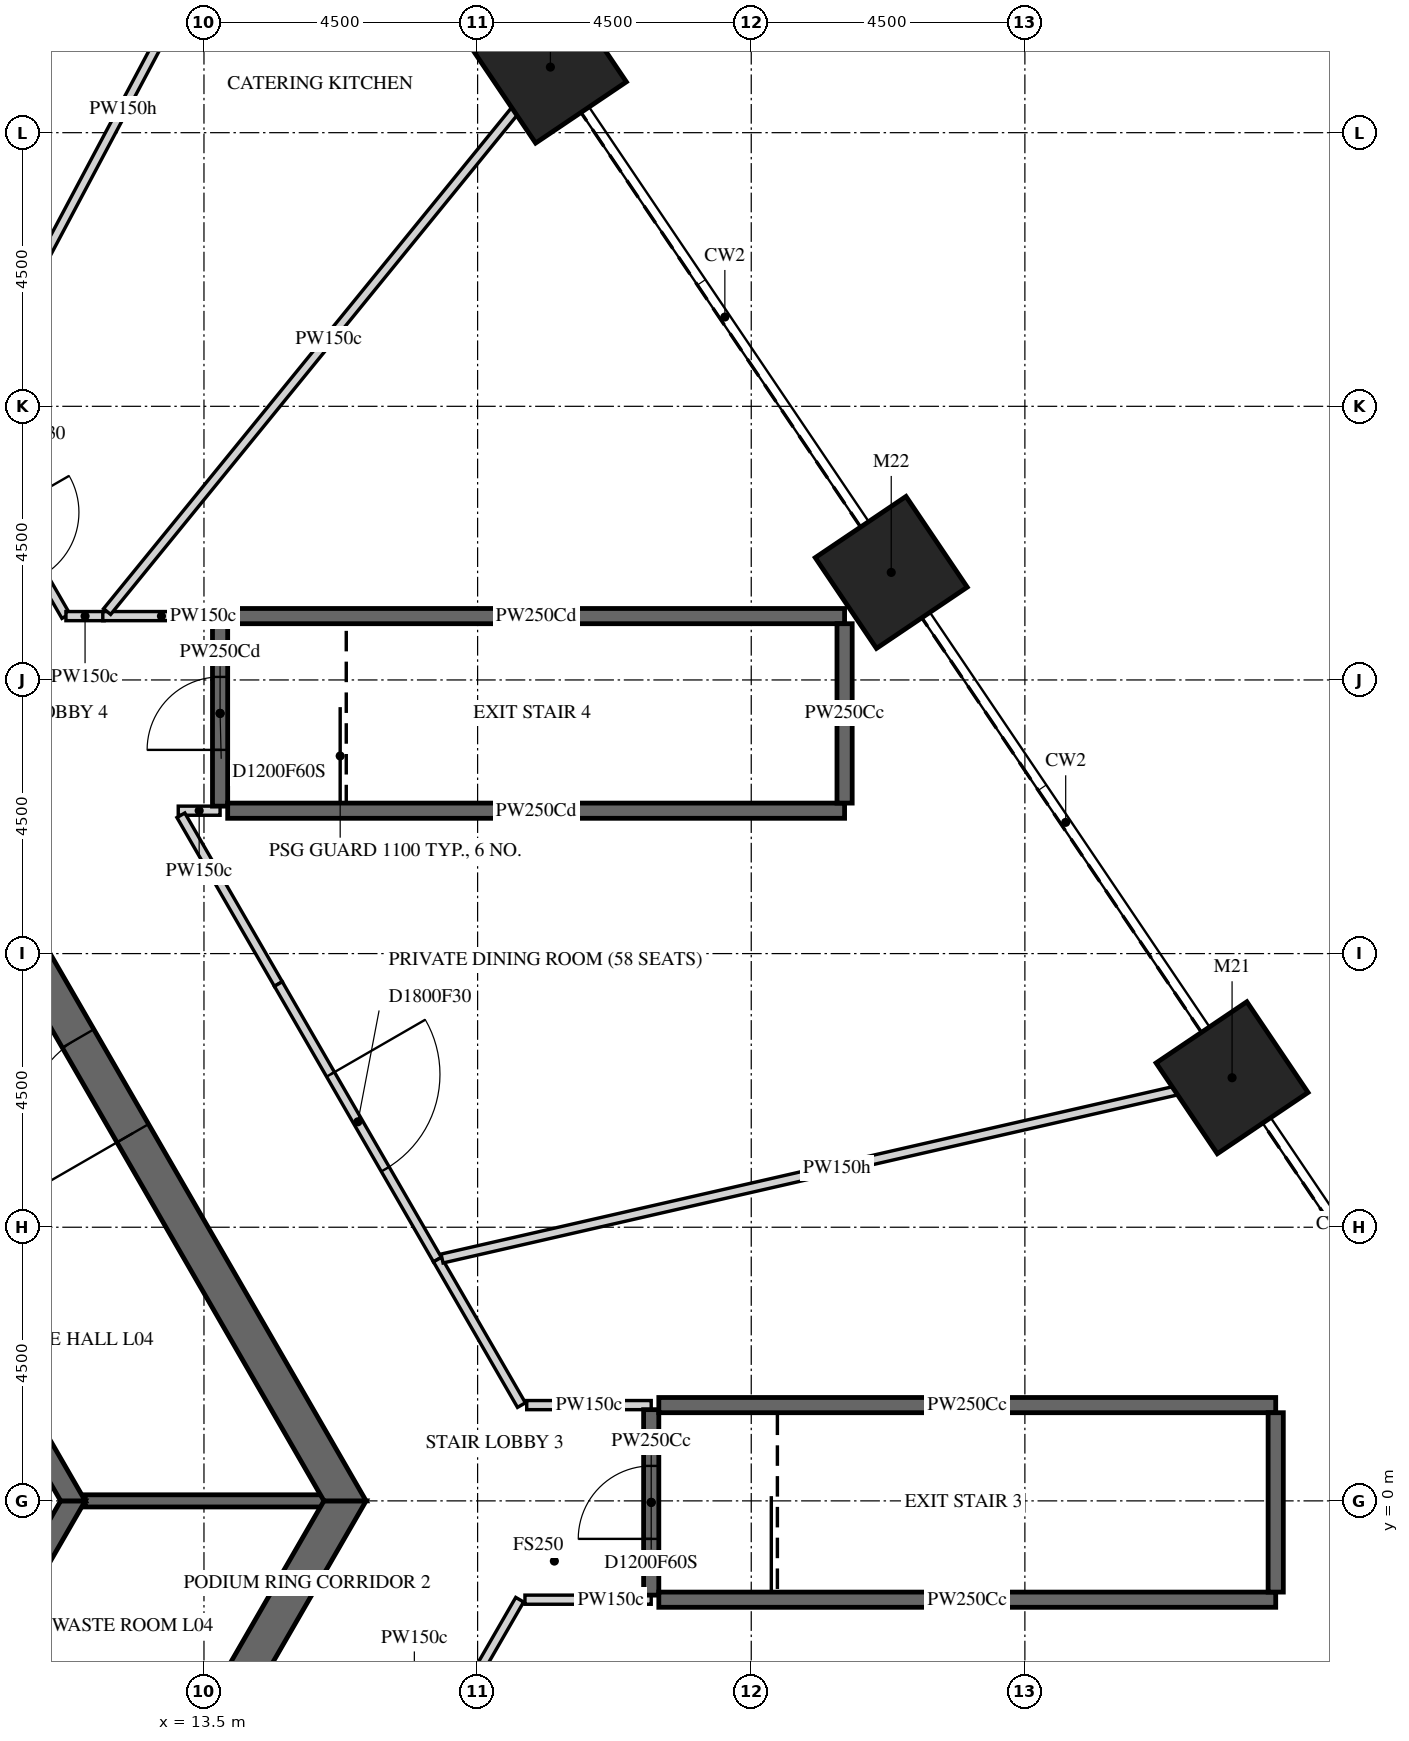
"""IFC4 building model, lengths in metres.
Left out: names, types, materials, properties, quantities, classifications, styles, units other than length and angle.
Written with IfcOpenShell. Run it as: python <this file> out.ifc"""

import sys

from ifc_helpers import new_model, si_unit, direction, frame, frame_2d, origin, origin_2d, place, context, subcontext, project, spatial, polyline, rectangle, outline, extrude, element, fill, save


model = new_model("IFC4")
c1 = context("Model", 3, precision=1e-05, world=origin(), true_north=direction((0.0, 1.0)))
c2 = subcontext(c1, "Body", "Model", "MODEL_VIEW")
j1 = project(units=[si_unit("LENGTHUNIT", "METRE"), si_unit("PLANEANGLEUNIT", "RADIAN")], contexts=[c1])
p1 = place(None, origin())
s1 = spatial("IfcSite", under=j1, at=p1, CompositionType="ELEMENT")
p2 = place(p1, origin())
s2 = spatial("IfcBuilding", under=s1, at=p2, CompositionType="ELEMENT")
p3 = place(p2, frame((0.0, 0.0, 26.0)))
s3 = spatial("IfcBuildingStorey", under=s2, at=p3, CompositionType="ELEMENT", Elevation=26.0)
for number, where, z_axis, x_axis in (
    (1, (30.407, 6.958, -0.25), (0.0, 0.0, 1.0), (0.559, -0.829, 0.0)),
    (2, (24.802, 15.269, -0.25), (0.0, 0.0, 1.0), (0.559, -0.829, 0.0)),
    (3, (19.197, 23.579, -0.25), (0.0, 0.0, 1.0), (0.559, -0.829, 0.0)),
):
    element("IfcColumn", number, at=place(p3, frame(where, z_axis=z_axis, x_axis=x_axis)), inside=s3, PredefinedType="COLUMN", context=c2, shape_type="SweptSolid", body=[
        extrude(rectangle(XDim=1.8, YDim=1.8, at=origin_2d()), origin(), (0.0, 0.0, 1.0), 5.45),
    ])
p4 = place(p3, frame((7.91, -13.7, -0.25), z_axis=(0.0, 0.0, 1.0), x_axis=(0.499999880136, 0.866025472988, 0.0)))
e4 = element("IfcWall", 4, at=p4, inside=s3, PredefinedType="SHEAR", context=c2, shape_type="SweptSolid", body=[
    extrude(outline(polyline([(-0.173, -0.3), (15.993, -0.3), (15.646, 0.3), (0.173, 0.3), (-0.173, -0.3)])), origin(), (0.0, 0.0, 1.0), 5.45),
])
p5 = place(p4, frame((7.039, 0.0, 0.25)))
e5 = element("IfcOpeningElement", 5, at=p5, cuts=e4, PredefinedType="OPENING", context=c2, shape_type="SweptSolid", body=[
    extrude(rectangle(XDim=1.8, YDim=2.4, at=frame_2d((0.9, 1.2))), frame((0.0, 0.31, 0.0), z_axis=(0.0, -1.0, 0.0), x_axis=(1.0, 0.0, 0.0)), (0.0, 0.0, 1.0), 0.62),
])
p6 = place(p3, frame((15.819, 0.0, -0.25), z_axis=(0.0, 0.0, 1.0), x_axis=(-0.499999880136, 0.866025472988, 0.0)))
e6 = element("IfcWall", 6, at=p6, inside=s3, PredefinedType="SHEAR", context=c2, shape_type="SweptSolid", body=[
    extrude(outline(polyline([(-0.173, -0.3), (15.993, -0.3), (15.646, 0.3), (0.173, 0.3), (-0.173, -0.3)])), origin(), (0.0, 0.0, 1.0), 5.45),
])
p7 = place(p6, frame((6.981, 0.0, 0.25)))
e7 = element("IfcOpeningElement", 7, at=p7, cuts=e6, PredefinedType="OPENING", context=c2, shape_type="SweptSolid", body=[
    extrude(rectangle(XDim=1.8, YDim=2.4, at=frame_2d((0.9, 1.2))), frame((0.0, 0.31, 0.0), z_axis=(0.0, -1.0, 0.0), x_axis=(1.0, 0.0, 0.0)), (0.0, 0.0, 1.0), 0.62),
])
p8 = place(p3, frame((5.673, -9.825, -0.25), z_axis=(0.0, 0.0, 1.0), x_axis=(0.499995046907, 0.866028263435, 0.0)))
e8 = element("IfcWall", 8, at=p8, inside=s3, PredefinedType="SHEAR", context=c2, shape_type="SweptSolid", body=[
    extrude(outline(polyline([(-0.101, -0.175), (11.446, -0.175), (11.244, 0.175), (0.101, 0.175), (-0.101, -0.175)])), origin(), (0.0, 0.0, 1.0), 5.45),
])
p9 = place(p8, frame((4.801, 0.0, 0.25)))
e9 = element("IfcOpeningElement", 9, at=p9, cuts=e8, PredefinedType="OPENING", context=c2, shape_type="SweptSolid", body=[
    extrude(rectangle(XDim=1.8, YDim=2.4, at=frame_2d((0.9, 1.2))), frame((0.0, 0.185, 0.0), z_axis=(0.0, -1.0, 0.0), x_axis=(1.0, 0.0, 0.0)), (0.0, 0.0, 1.0), 0.37),
])
p10 = place(p3, frame((11.345, 0.0, -0.25), z_axis=(0.0, 0.0, 1.0), x_axis=(-0.499995046907, 0.866028263435, 0.0)))
e10 = element("IfcWall", 10, at=p10, inside=s3, PredefinedType="SHEAR", context=c2, shape_type="SweptSolid", body=[
    extrude(outline(polyline([(-0.101, -0.175), (11.446, -0.175), (11.244, 0.175), (0.101, 0.175), (-0.101, -0.175)])), origin(), (0.0, 0.0, 1.0), 5.45),
])
p11 = place(p10, frame((4.744, 0.0, 0.25)))
e11 = element("IfcOpeningElement", 11, at=p11, cuts=e10, PredefinedType="OPENING", context=c2, shape_type="SweptSolid", body=[
    extrude(rectangle(XDim=1.8, YDim=2.4, at=frame_2d((0.9, 1.2))), frame((0.0, 0.185, 0.0), z_axis=(0.0, -1.0, 0.0), x_axis=(1.0, 0.0, 0.0)), (0.0, 0.0, 1.0), 0.37),
])
p12 = place(p3, frame((11.547, 0.0, -0.25), z_axis=(0.0, 0.0, 1.0), x_axis=(1.0, 0.0, 0.0)))
e12 = element("IfcWall", 12, at=p12, inside=s3, PredefinedType="SHEAR", context=c2, shape_type="SweptSolid", body=[
    extrude(rectangle(XDim=3.926, YDim=0.2, at=frame_2d((1.963, 0.0))), origin(), (0.0, 0.0, 1.0), 5.45),
])
p13 = place(p3, frame((9.858, 16.925, 0.0), z_axis=(0.0, 0.0, 1.0), x_axis=(0.499835495421, -0.866120359718, 0.0)))
e13 = element("IfcWall", 13, at=p13, inside=s3, PredefinedType="PARTITIONING", context=c2, shape_type="SweptSolid", body=[
    extrude(rectangle(XDim=2.742, YDim=0.15, at=frame_2d((1.371, 0.0))), origin(), (0.0, 0.0, 1.0), 5.2),
])
p14 = place(p13, frame((0.771, 0.0, 0.0)))
e14 = element("IfcOpeningElement", 14, at=p14, cuts=e13, PredefinedType="OPENING", context=c2, shape_type="SweptSolid", body=[
    extrude(rectangle(XDim=1.2, YDim=2.1, at=frame_2d((0.6, 1.05))), frame((0.0, 0.085, 0.0), z_axis=(0.0, -1.0, 0.0), x_axis=(1.0, 0.0, 0.0)), (0.0, 0.0, 1.0), 0.17),
])
p15 = place(p3, frame((11.23, 14.55, 0.0), z_axis=(0.0, 0.0, 1.0), x_axis=(1.0, 0.0, 0.0)))
e15 = element("IfcWall", 15, at=p15, inside=s3, PredefinedType="PARTITIONING", context=c2, shape_type="SweptSolid", body=[
    extrude(rectangle(XDim=0.629, YDim=0.15, at=frame_2d((0.314, 0.0))), origin(), (0.0, 0.0, 1.0), 5.2),
])
p16 = place(p3, frame((11.836, 14.55, 0.0), z_axis=(0.0, 0.0, 1.0), x_axis=(1.0, 0.0, 0.0)))
e16 = element("IfcWall", 16, at=p16, inside=s3, PredefinedType="PARTITIONING", context=c2, shape_type="SweptSolid", body=[
    extrude(rectangle(XDim=1.929, YDim=0.15, at=frame_2d((0.964, 0.0))), origin(), (0.0, 0.0, 1.0), 5.2),
])
p17 = place(p3, frame((13.015, 29.1, 0.0), z_axis=(0.0, 0.0, 1.0), x_axis=(-0.408286813769, -0.912853700054, 0.0)))
e17 = element("IfcWall", 17, at=p17, inside=s3, PredefinedType="PARTITIONING", context=c2, shape_type="SweptSolid", body=[
    extrude(rectangle(XDim=13.173, YDim=0.15, at=frame_2d((6.586, 0.0))), origin(), (0.0, 0.0, 1.0), 4.273),
])
p18 = place(p3, frame((13.765, 11.35, 0.0), z_axis=(0.0, 0.0, 1.0), x_axis=(-1.0, 0.0, 0.0)))
e18 = element("IfcWall", 18, at=p18, inside=s3, PredefinedType="PARTITIONING", context=c2, shape_type="SweptSolid", body=[
    extrude(rectangle(XDim=0.688, YDim=0.15, at=frame_2d((0.344, 0.0))), origin(), (0.0, 0.0, 1.0), 5.2),
])
p19 = place(p3, frame((13.765, 11.425, 0.0), z_axis=(0.0, 0.0, 1.0), x_axis=(0.0, 1.0, 0.0)))
e19 = element("IfcWall", 19, at=p19, inside=s3, PredefinedType="PARTITIONING", context=c2, shape_type="SweptSolid", body=[
    extrude(rectangle(XDim=3.05, YDim=0.25, at=frame_2d((1.525, 0.0))), origin(), (0.0, 0.0, 1.0), 4.273),
])
p20 = place(p19, frame((0.925, 0.0, 0.0)))
e20 = element("IfcOpeningElement", 20, at=p20, cuts=e19, PredefinedType="OPENING", context=c2, shape_type="SweptSolid", body=[
    extrude(rectangle(XDim=1.2, YDim=2.1, at=frame_2d((0.6, 1.05))), frame((0.0, 0.135, 0.0), z_axis=(0.0, -1.0, 0.0), x_axis=(1.0, 0.0, 0.0)), (0.0, 0.0, 1.0), 0.27),
])
p21 = place(p3, frame((13.89, 14.55, 0.0), z_axis=(0.0, 0.0, 1.0), x_axis=(1.0, 0.0, 0.0)))
e21 = element("IfcWall", 21, at=p21, inside=s3, PredefinedType="PARTITIONING", context=c2, shape_type="SweptSolid", body=[
    extrude(rectangle(XDim=10.145, YDim=0.25, at=frame_2d((5.073, 0.0))), origin(), (0.0, 0.0, 1.0), 4.273),
])
p22 = place(p3, frame((14.723, 8.5, 0.0), z_axis=(0.0, 0.0, 1.0), x_axis=(-0.500104956678, 0.865964798538, 0.0)))
e22 = element("IfcWall", 22, at=p22, inside=s3, PredefinedType="PARTITIONING", context=c2, shape_type="SweptSolid", body=[
    extrude(rectangle(XDim=3.204, YDim=0.15, at=frame_2d((1.602, 0.0))), origin(), (0.0, 0.0, 1.0), 5.2),
])
p23 = place(p3, frame((18.692, -1.625, 0.0), z_axis=(0.0, 0.0, 1.0), x_axis=(-0.500053906551, -0.865994278585, 0.0)))
e23 = element("IfcWall", 23, at=p23, inside=s3, PredefinedType="PARTITIONING", context=c2, shape_type="SweptSolid", body=[
    extrude(rectangle(XDim=6.928, YDim=0.15, at=frame_2d((3.464, 0.0))), origin(), (0.0, 0.0, 1.0), 5.2),
])
p24 = place(p23, frame((2.564, 0.0, 0.0)))
e24 = element("IfcOpeningElement", 24, at=p24, cuts=e23, PredefinedType="OPENING", context=c2, shape_type="SweptSolid", body=[
    extrude(rectangle(XDim=1.8, YDim=2.1, at=frame_2d((0.9, 1.05))), frame((0.0, 0.085, 0.0), z_axis=(0.0, -1.0, 0.0), x_axis=(1.0, 0.0, 0.0)), (0.0, 0.0, 1.0), 0.17),
])
p25 = place(p3, frame((15.261, 28.701, 0.0), z_axis=(0.0, 0.0, 1.0), x_axis=(-0.469500426527, -0.882932245131, 0.0)))
e25 = element("IfcWall", 25, at=p25, inside=s3, PredefinedType="PARTITIONING", context=c2, shape_type="SweptSolid", body=[
    extrude(rectangle(XDim=13.167, YDim=0.15, at=frame_2d((6.584, 0.0))), origin(), (0.0, 0.0, 1.0), 4.273),
])
p26 = place(p3, frame((14.723, 8.5, 0.0), z_axis=(0.0, 0.0, 1.0), x_axis=(0.499952654668, -0.866052736899, 0.0)))
e26 = element("IfcWall", 26, at=p26, inside=s3, PredefinedType="PARTITIONING", context=c2, shape_type="SweptSolid", body=[
    extrude(rectangle(XDim=5.233, YDim=0.15, at=frame_2d((2.616, 0.0))), origin(), (0.0, 0.0, 1.0), 5.2),
])
p27 = place(p26, frame((1.716, 0.0, 0.0)))
e27 = element("IfcOpeningElement", 27, at=p27, cuts=e26, PredefinedType="OPENING", context=c2, shape_type="SweptSolid", body=[
    extrude(rectangle(XDim=1.8, YDim=2.1, at=frame_2d((0.9, 1.05))), frame((0.0, 0.085, 0.0), z_axis=(0.0, -1.0, 0.0), x_axis=(1.0, 0.0, 0.0)), (0.0, 0.0, 1.0), 0.17),
])
p28 = place(p3, frame((18.721, 1.575, 0.0), z_axis=(0.0, 0.0, 1.0), x_axis=(-0.500053847239, 0.865994312834, 0.0)))
e28 = element("IfcWall", 28, at=p28, inside=s3, PredefinedType="PARTITIONING", context=c2, shape_type="SweptSolid", body=[
    extrude(rectangle(XDim=2.763, YDim=0.15, at=frame_2d((1.382, 0.0))), origin(), (0.0, 0.0, 1.0), 5.2),
])
p29 = place(p3, frame((18.808, 1.575, 0.0), z_axis=(0.0, 0.0, 1.0), x_axis=(1.0, 0.0, 0.0)))
e29 = element("IfcWall", 29, at=p29, inside=s3, PredefinedType="PARTITIONING", context=c2, shape_type="SweptSolid", body=[
    extrude(rectangle(XDim=2.047, YDim=0.15, at=frame_2d((1.024, 0.0))), origin(), (0.0, 0.0, 1.0), 5.2),
])
p30 = place(p3, frame((19.197, 23.578, 0.0), z_axis=(0.0, 0.0, 1.0), x_axis=(-0.631417805909, -0.775442811805, 0.0)))
e30 = element("IfcWall", 30, at=p30, inside=s3, PredefinedType="PARTITIONING", context=c2, shape_type="SweptSolid", body=[
    extrude(rectangle(XDim=11.545, YDim=0.15, at=frame_2d((5.773, 0.0))), origin(), (0.0, 0.0, 1.0), 5.2),
])
p31 = place(p3, frame((20.855, -1.625, 0.0), z_axis=(0.0, 0.0, 1.0), x_axis=(-1.0, 0.0, 0.0)))
e31 = element("IfcWall", 31, at=p31, inside=s3, PredefinedType="PARTITIONING", context=c2, shape_type="SweptSolid", body=[
    extrude(rectangle(XDim=2.076, YDim=0.15, at=frame_2d((1.038, 0.0))), origin(), (0.0, 0.0, 1.0), 5.2),
])
p32 = place(p3, frame((20.855, -1.55, 0.0), z_axis=(0.0, 0.0, 1.0), x_axis=(0.0, 1.0, 0.0)))
e32 = element("IfcWall", 32, at=p32, inside=s3, PredefinedType="PARTITIONING", context=c2, shape_type="SweptSolid", body=[
    extrude(rectangle(XDim=3.05, YDim=0.25, at=frame_2d((1.525, 0.0))), origin(), (0.0, 0.0, 1.0), 5.2),
])
p33 = place(p32, frame((0.925, 0.0, 0.0)))
e33 = element("IfcOpeningElement", 33, at=p33, cuts=e32, PredefinedType="OPENING", context=c2, shape_type="SweptSolid", body=[
    extrude(rectangle(XDim=1.2, YDim=2.1, at=frame_2d((0.6, 1.05))), frame((0.0, 0.135, 0.0), z_axis=(0.0, -1.0, 0.0), x_axis=(1.0, 0.0, 0.0)), (0.0, 0.0, 1.0), 0.27),
])
p34 = place(p3, frame((20.98, 1.575, 0.0), z_axis=(0.0, 0.0, 1.0), x_axis=(1.0, 0.0, 0.0)))
e34 = element("IfcWall", 34, at=p34, inside=s3, PredefinedType="PARTITIONING", context=c2, shape_type="SweptSolid", body=[
    extrude(rectangle(XDim=10.145, YDim=0.25, at=frame_2d((5.073, 0.0))), origin(), (0.0, 0.0, 1.0), 5.2),
])
p35 = place(p3, frame((24.035, 11.35, 0.0), z_axis=(0.0, 0.0, 1.0), x_axis=(-1.0, 0.0, 0.0)))
e35 = element("IfcWall", 35, at=p35, inside=s3, PredefinedType="PARTITIONING", context=c2, shape_type="SweptSolid", body=[
    extrude(rectangle(XDim=10.145, YDim=0.25, at=frame_2d((5.073, 0.0))), origin(), (0.0, 0.0, 1.0), 4.273),
])
p36 = place(p3, frame((24.035, 14.425, 0.0), z_axis=(0.0, 0.0, 1.0), x_axis=(0.0, -1.0, 0.0)))
e36 = element("IfcWall", 36, at=p36, inside=s3, PredefinedType="PARTITIONING", context=c2, shape_type="SweptSolid", body=[
    extrude(rectangle(XDim=2.95, YDim=0.25, at=frame_2d((1.475, 0.0))), origin(), (0.0, 0.0, 1.0), 5.2),
])
p37 = place(p3, frame((30.407, 6.958, 0.0), z_axis=(0.0, 0.0, 1.0), x_axis=(-0.974810618682, -0.223034207477, 0.0)))
e37 = element("IfcWall", 37, at=p37, inside=s3, PredefinedType="PARTITIONING", context=c2, shape_type="SweptSolid", body=[
    extrude(rectangle(XDim=13.327, YDim=0.15, at=frame_2d((6.664, 0.0))), origin(), (0.0, 0.0, 1.0), 4.273),
])
p38 = place(p3, frame((31.125, -1.625, 0.0), z_axis=(0.0, 0.0, 1.0), x_axis=(-1.0, 0.0, 0.0)))
e38 = element("IfcWall", 38, at=p38, inside=s3, PredefinedType="PARTITIONING", context=c2, shape_type="SweptSolid", body=[
    extrude(rectangle(XDim=10.145, YDim=0.25, at=frame_2d((5.073, 0.0))), origin(), (0.0, 0.0, 1.0), 5.2),
])
p39 = place(p3, frame((31.125, 1.45, 0.0), z_axis=(0.0, 0.0, 1.0), x_axis=(0.0, -1.0, 0.0)))
e39 = element("IfcWall", 39, at=p39, inside=s3, PredefinedType="PARTITIONING", context=c2, shape_type="SweptSolid", body=[
    extrude(rectangle(XDim=2.95, YDim=0.25, at=frame_2d((1.475, 0.0))), origin(), (0.0, 0.0, 1.0), 5.2),
])
p40 = place(p7, origin())
e40 = element("IfcDoor", 40, at=p40, inside=s3, OperationType="DOUBLE_DOOR_SINGLE_SWING", PredefinedType="DOOR", context=c2, shape_type="SweptSolid", body=[
    extrude(rectangle(XDim=1.8, YDim=2.4, at=frame_2d((0.9, 1.2))), frame((0.0, 0.025, 0.0), z_axis=(0.0, -1.0, 0.0), x_axis=(1.0, 0.0, 0.0)), (0.0, 0.0, 1.0), 0.05),
])
fill(e7, e40)
p41 = place(p20, origin())
e41 = element("IfcDoor", 41, at=p41, inside=s3, OperationType="SINGLE_SWING_RIGHT", PredefinedType="DOOR", context=c2, shape_type="SweptSolid", body=[
    extrude(rectangle(XDim=1.2, YDim=2.1, at=frame_2d((0.6, 1.05))), frame((0.0, 0.025, 0.0), z_axis=(0.0, -1.0, 0.0), x_axis=(1.0, 0.0, 0.0)), (0.0, 0.0, 1.0), 0.05),
])
fill(e20, e41)
p42 = place(p27, origin())
e42 = element("IfcDoor", 42, at=p42, inside=s3, OperationType="DOUBLE_DOOR_SINGLE_SWING", PredefinedType="DOOR", context=c2, shape_type="SweptSolid", body=[
    extrude(rectangle(XDim=1.8, YDim=2.1, at=frame_2d((0.9, 1.05))), frame((0.0, 0.025, 0.0), z_axis=(0.0, -1.0, 0.0), x_axis=(1.0, 0.0, 0.0)), (0.0, 0.0, 1.0), 0.05),
])
fill(e27, e42)
p43 = place(p33, origin())
e43 = element("IfcDoor", 43, at=p43, inside=s3, OperationType="SINGLE_SWING_LEFT", PredefinedType="DOOR", context=c2, shape_type="SweptSolid", body=[
    extrude(rectangle(XDim=1.2, YDim=2.1, at=frame_2d((0.6, 1.05))), frame((0.0, 0.025, 0.0), z_axis=(0.0, -1.0, 0.0), x_axis=(1.0, 0.0, 0.0)), (0.0, 0.0, 1.0), 0.05),
])
fill(e33, e43)
save(model, sys.argv[1])
